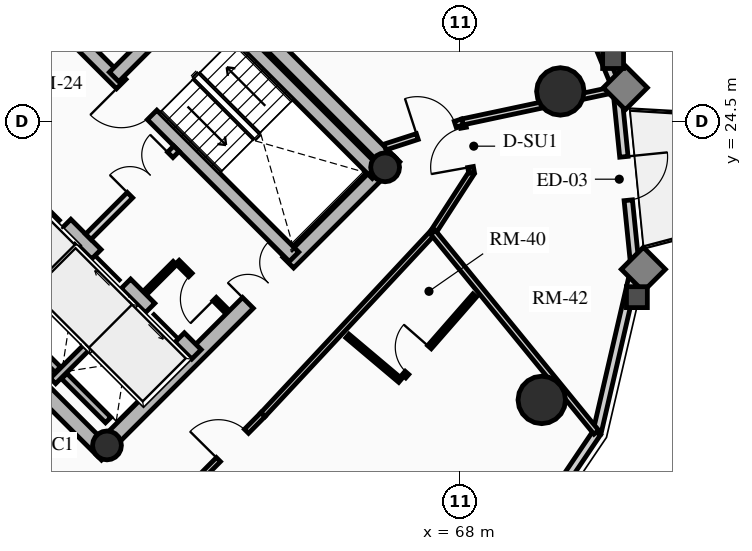
"""IFC4 building model, lengths in metres.
Left out: names, types, materials, properties, quantities, classifications, styles, units other than length and angle.
Written with IfcOpenShell. Run it as: python <this file> out.ifc"""

import sys

from ifc_helpers import new_model, si_unit, direction, frame, frame_2d, origin, origin_2d, place, context, subcontext, project, spatial, rectangle, circle, hollow_circle, extrude, source, transform, mapped, element, fill, save


model = new_model("IFC4")
c1 = context("Model", 3, precision=1e-05, world=origin(), true_north=direction((0.0, 1.0)))
c2 = subcontext(c1, "Body", "Model", "MODEL_VIEW")
j1 = project(units=[si_unit("LENGTHUNIT", "METRE"), si_unit("PLANEANGLEUNIT", "RADIAN")], contexts=[c1])
p1 = place(None, origin())
s1 = spatial("IfcSite", under=j1, at=p1, CompositionType="ELEMENT")
p2 = place(p1, origin())
s2 = spatial("IfcBuilding", under=s1, at=p2, CompositionType="ELEMENT")
p3 = place(p2, frame((0.0, 0.0, 177.79)))
s3 = spatial("IfcBuildingStorey", under=s2, at=p3, CompositionType="ELEMENT", Elevation=177.79)
for number, where, z_axis, x_axis in (
    (1, (58.702, 15.732, 0.0), (0.0, 0.0, 1.0), (-0.707, 0.707, 0.0)),
    (2, (66.268, 23.298, 0.0), (0.0, 0.0, 1.0), (-0.707, 0.707, 0.0)),
):
    element("IfcWall", number, at=place(p3, frame(where, z_axis=z_axis, x_axis=x_axis)), inside=s3, PredefinedType="SHEAR", context=c2, shape_type="SweptSolid", body=[
        extrude(rectangle(XDim=14.1, YDim=0.4, at=frame_2d((7.05, 0.0))), origin(), (0.0, 0.0, 1.0), 2.91),
    ])
p4 = place(p3, frame((58.561, 15.873, 0.0), z_axis=(0.0, 0.0, 1.0), x_axis=(0.707106781187, 0.707106781187, 0.0)))
e3 = element("IfcWall", 3, at=p4, inside=s3, PredefinedType="SHEAR", context=c2, shape_type="SweptSolid", body=[
    extrude(rectangle(XDim=10.7, YDim=0.4, at=frame_2d((5.35, 0.0))), origin(), (0.0, 0.0, 1.0), 2.91),
])
m1 = source(origin(), c2, "Body", "SweptSolid", [
    extrude(rectangle(XDim=1.5, YDim=2.02, at=frame_2d((0.75, 1.01))), frame((0.0, 0.21, 0.0), z_axis=(0.0, -1.0, 0.0), x_axis=(1.0, 0.0, 0.0)), (0.0, 0.0, 1.0), 0.42),
])
p5 = place(p4, frame((5.45, 0.0, 0.0)))
e4 = element("IfcOpeningElement", 4, at=p5, cuts=e3, PredefinedType="OPENING", context=c2, shape_type="MappedRepresentation", body=[
    mapped(m1, transform((0.0, 0.0, 0.0), x_axis=(1.0, 0.0, 0.0), y_axis=(0.0, 1.0, 0.0), z_axis=(0.0, 0.0, 1.0), scale=1.0)),
])
p6 = place(p3, frame((61.06, 18.373, 0.0), z_axis=(0.0, 0.0, 1.0), x_axis=(-0.707106781187, 0.707106781187, 0.0)))
e5 = element("IfcWall", 5, at=p6, inside=s3, PredefinedType="SHEAR", context=c2, shape_type="SweptSolid", body=[
    extrude(rectangle(XDim=13.7, YDim=0.35, at=frame_2d((6.85, 0.0))), origin(), (0.0, 0.0, 1.0), 2.91),
])
m2 = source(origin(), c2, "Body", "SweptSolid", [
    extrude(rectangle(XDim=1.1, YDim=2.015, at=frame_2d((0.55, 1.007))), frame((0.0, 0.185, 0.0), z_axis=(0.0, -1.0, 0.0), x_axis=(1.0, 0.0, 0.0)), (0.0, 0.0, 1.0), 0.37),
])
p7 = place(p6, frame((4.85, 0.0, 0.0)))
e6 = element("IfcOpeningElement", 6, at=p7, cuts=e5, PredefinedType="OPENING", context=c2, shape_type="MappedRepresentation", body=[
    mapped(m2, transform((0.0, 0.0, 0.0), x_axis=(1.0, 0.0, 0.0), y_axis=(0.0, 1.0, 0.0), z_axis=(0.0, 0.0, 1.0), scale=1.0)),
])
p8 = place(p6, frame((0.625, 0.0, 0.0)))
e7 = element("IfcOpeningElement", 7, at=p8, cuts=e5, PredefinedType="OPENING", context=c2, shape_type="MappedRepresentation", body=[
    mapped(m2, transform((0.0, 0.0, 0.0), x_axis=(1.0, 0.0, 0.0), y_axis=(0.0, 1.0, 0.0), z_axis=(0.0, 0.0, 1.0), scale=1.0)),
])
p9 = place(p6, frame((2.625, 0.0, 0.0)))
e8 = element("IfcOpeningElement", 8, at=p9, cuts=e5, PredefinedType="OPENING", context=c2, shape_type="MappedRepresentation", body=[
    mapped(m2, transform((0.0, 0.0, 0.0), x_axis=(1.0, 0.0, 0.0), y_axis=(0.0, 1.0, 0.0), z_axis=(0.0, 0.0, 1.0), scale=1.0)),
])
m3 = source(origin(), c2, "Body", "SweptSolid", [
    extrude(rectangle(XDim=1.15, YDim=2.02, at=frame_2d((0.575, 1.01))), frame((0.0, 0.185, 0.0), z_axis=(0.0, -1.0, 0.0), x_axis=(1.0, 0.0, 0.0)), (0.0, 0.0, 1.0), 0.37),
])
p10 = place(p6, frame((7.27, 0.0, 0.0)))
e9 = element("IfcOpeningElement", 9, at=p10, cuts=e5, PredefinedType="OPENING", context=c2, shape_type="MappedRepresentation", body=[
    mapped(m3, transform((0.0, 0.0, 0.0), x_axis=(1.0, 0.0, 0.0), y_axis=(0.0, 1.0, 0.0), z_axis=(0.0, 0.0, 1.0), scale=1.0)),
])
p11 = place(p3, frame((63.627, 20.94, 0.0), z_axis=(0.0, 0.0, 1.0), x_axis=(-0.707119496762, 0.707094065383, 0.0)))
e10 = element("IfcWall", 10, at=p11, inside=s3, PredefinedType="SHEAR", context=c2, shape_type="SweptSolid", body=[
    extrude(rectangle(XDim=9.6, YDim=0.35, at=frame_2d((4.8, 0.0))), origin(), (0.0, 0.0, 1.0), 2.91),
])
p12 = place(p11, frame((5.28, 0.0, 0.0)))
e11 = element("IfcOpeningElement", 11, at=p12, cuts=e10, PredefinedType="OPENING", context=c2, shape_type="MappedRepresentation", body=[
    mapped(m3, transform((0.0, 0.0, 0.0), x_axis=(1.0, 0.0, 0.0), y_axis=(0.0, 1.0, 0.0), z_axis=(0.0, 0.0, 1.0), scale=1.0)),
])
p13 = place(p3, frame((65.812, 23.125, 0.0), z_axis=(0.0, 0.0, 1.0), x_axis=(-0.707106781187, 0.707106781187, 0.0)))
e12 = element("IfcWall", 12, at=p13, inside=s3, PredefinedType="SHEAR", context=c2, shape_type="SweptSolid", body=[
    extrude(rectangle(XDim=6.695, YDim=0.35, at=frame_2d((3.348, 0.0))), origin(), (0.0, 0.0, 1.0), 2.91),
])
p14 = place(p3, frame((58.893, 25.674, 0.0), z_axis=(0.0, 0.0, 1.0), x_axis=(0.707106781187, 0.707106781187, 0.0)))
e13 = element("IfcWall", 13, at=p14, inside=s3, PredefinedType="SHEAR", context=c2, shape_type="SweptSolid", body=[
    extrude(rectangle(XDim=3.285, YDim=0.35, at=frame_2d((1.643, 0.0))), origin(), (0.0, 0.0, 1.0), 2.91),
])
for number, where, z_axis, x_axis in (
    (14, (58.706, 15.976, 0.0), (0.0, 0.0, 1.0), (0.707, 0.707, 0.0)),
    (15, (66.024, 23.294, 0.0), (0.0, 0.0, 1.0), (0.707, 0.707, 0.0)),
):
    element("IfcColumn", number, at=place(p3, frame(where, z_axis=z_axis, x_axis=x_axis)), inside=s3, PredefinedType="COLUMN", context=c2, shape_type="SweptSolid", body=[
        extrude(hollow_circle(Radius=0.38, WallThickness=0.032, at=origin_2d()), origin(), (0.0, 0.0, 1.0), 2.91),
    ])
for number, where, z_axis, x_axis in (
    (16, (70.146, 17.173, 0.0), (0.0, 0.0, 1.0), (1.0, 0.0, 0.0)),
    (17, (70.635, 25.291, 0.0), (0.0, 0.0, 1.0), (1.0, 0.0, 0.0)),
):
    element("IfcColumn", number, at=place(p3, frame(where, z_axis=z_axis, x_axis=x_axis)), inside=s3, PredefinedType="USERDEFINED", context=c2, shape_type="SweptSolid", body=[
        extrude(circle(Radius=0.625, at=origin_2d()), origin(), (0.0, 0.0, 1.0), 2.91),
    ])
p15 = place(p3, frame((71.6, 16.313, 0.0), z_axis=(0.0, 0.0, 1.0), x_axis=(-0.55951912514, -0.828817439852, 0.0)))
e18 = element("IfcWall", 18, at=p15, inside=s3, PredefinedType="SOLIDWALL", context=c2, shape_type="SweptSolid", body=[
    extrude(rectangle(XDim=4.259, YDim=0.22, at=frame_2d((2.129, 0.0))), origin(), (0.0, 0.0, 1.0), 2.245),
])
m4 = source(origin(), c2, "Body", "SweptSolid", [
    extrude(rectangle(XDim=1.6, YDim=1.3, at=frame_2d((0.8, 0.65))), frame((0.0, 0.12, 0.0), z_axis=(0.0, -1.0, 0.0), x_axis=(1.0, 0.0, 0.0)), (0.0, 0.0, 1.0), 0.24),
])
p16 = place(p15, frame((1.33, 0.0, 0.65)))
e19 = element("IfcOpeningElement", 19, at=p16, cuts=e18, PredefinedType="OPENING", context=c2, shape_type="MappedRepresentation", body=[
    mapped(m4, transform((0.0, 0.0, 0.0), x_axis=(1.0, 0.0, 0.0), y_axis=(0.0, 1.0, 0.0), z_axis=(0.0, 0.0, 1.0), scale=1.0)),
])
p17 = place(p3, frame((72.603, 20.645, 0.0), z_axis=(0.0, 0.0, 1.0), x_axis=(-0.22557328587, -0.97422620202, 0.0)))
e20 = element("IfcWall", 20, at=p17, inside=s3, PredefinedType="SOLIDWALL", context=c2, shape_type="SweptSolid", body=[
    extrude(rectangle(XDim=4.446, YDim=0.22, at=frame_2d((2.223, 0.0))), origin(), (0.0, 0.0, 1.0), 2.245),
])
p18 = place(p3, frame((72.127, 25.354, 0.0), z_axis=(0.0, 0.0, 1.0), x_axis=(0.100438356004, -0.994943283129, 0.0)))
e21 = element("IfcWall", 21, at=p18, inside=s3, PredefinedType="SOLIDWALL", context=c2, shape_type="SweptSolid", body=[
    extrude(rectangle(XDim=4.733, YDim=0.22, at=frame_2d((2.366, 0.0))), origin(), (0.0, 0.0, 1.0), 2.245),
])
m5 = source(origin(), c2, "Body", "SweptSolid", [
    extrude(rectangle(XDim=1.15, YDim=2.005, at=frame_2d((0.575, 1.002))), frame((0.0, 0.12, 0.0), z_axis=(0.0, -1.0, 0.0), x_axis=(1.0, 0.0, 0.0)), (0.0, 0.0, 1.0), 0.24),
])
p19 = place(p18, frame((1.791, 0.0, 0.0)))
e22 = element("IfcOpeningElement", 22, at=p19, cuts=e21, PredefinedType="OPENING", context=c2, shape_type="MappedRepresentation", body=[
    mapped(m5, transform((0.0, 0.0, 0.0), x_axis=(1.0, 0.0, 0.0), y_axis=(0.0, 1.0, 0.0), z_axis=(0.0, 0.0, 1.0), scale=1.0)),
])
p20 = place(p3, frame((70.22, 29.979, 0.0), z_axis=(0.0, 0.0, 1.0), x_axis=(0.381196434348, -0.924494066201, 0.0)))
e23 = element("IfcWall", 23, at=p20, inside=s3, PredefinedType="SOLIDWALL", context=c2, shape_type="SweptSolid", body=[
    extrude(rectangle(XDim=5.003, YDim=0.22, at=frame_2d((2.501, 0.0))), origin(), (0.0, 0.0, 1.0), 2.245),
])
p21 = place(p3, frame((55.888, 19.069, 0.0), z_axis=(0.0, 0.0, 1.0), x_axis=(0.707106781187, 0.707106781187, 0.0)))
e24 = element("IfcWall", 24, at=p21, inside=s3, PredefinedType="SHEAR", context=c2, shape_type="SweptSolid", body=[
    extrude(rectangle(XDim=2.97, YDim=0.2, at=frame_2d((1.485, 0.0))), origin(), (0.0, 0.0, 1.0), 2.91),
])
p22 = place(p3, frame((57.284, 17.673, 0.0), z_axis=(0.0, 0.0, 1.0), x_axis=(0.707147878904, 0.70706568108, 0.0)))
e25 = element("IfcWall", 25, at=p22, inside=s3, PredefinedType="SHEAR", context=c2, shape_type="SweptSolid", body=[
    extrude(rectangle(XDim=2.97, YDim=0.2, at=frame_2d((1.485, 0.0))), origin(), (0.0, 0.0, 1.0), 2.91),
])
p23 = place(p3, frame((57.412, 17.97, 0.0), z_axis=(0.0, 0.0, 1.0), x_axis=(-0.707106781187, 0.707106781187, 0.0)))
e26 = element("IfcWall", 26, at=p23, inside=s3, PredefinedType="SHEAR", context=c2, shape_type="SweptSolid", body=[
    extrude(rectangle(XDim=1.735, YDim=0.2, at=frame_2d((0.867, 0.0))), origin(), (0.0, 0.0, 1.0), 2.91),
])
p24 = place(p3, frame((58.737, 16.644, 0.0), z_axis=(0.0, 0.0, 1.0), x_axis=(-0.707032117043, 0.707181437447, 0.0)))
e27 = element("IfcWall", 27, at=p24, inside=s3, PredefinedType="SHEAR", context=c2, shape_type="SweptSolid", body=[
    extrude(rectangle(XDim=1.635, YDim=0.2, at=frame_2d((0.817, 0.0))), origin(), (0.0, 0.0, 1.0), 2.91),
])
p25 = place(p3, frame((58.214, 21.467, 0.0), z_axis=(0.0, 0.0, 1.0), x_axis=(0.707106781187, 0.707106781187, 0.0)))
e28 = element("IfcWall", 28, at=p25, inside=s3, PredefinedType="PARTITIONING", context=c2, shape_type="SweptSolid", body=[
    extrude(rectangle(XDim=3.28, YDim=0.2, at=frame_2d((1.64, 0.0))), origin(), (0.0, 0.0, 1.0), 2.675),
])
m6 = source(origin(), c2, "Body", "SweptSolid", [
    extrude(rectangle(XDim=1.5, YDim=2.02, at=frame_2d((0.75, 1.01))), frame((0.0, 0.11, 0.0), z_axis=(0.0, -1.0, 0.0), x_axis=(1.0, 0.0, 0.0)), (0.0, 0.0, 1.0), 0.22),
])
p26 = place(p25, frame((1.55, 0.0, 0.0)))
e29 = element("IfcOpeningElement", 29, at=p26, cuts=e28, PredefinedType="OPENING", context=c2, shape_type="MappedRepresentation", body=[
    mapped(m6, transform((0.0, 0.0, 0.0), x_axis=(1.0, 0.0, 0.0), y_axis=(0.0, 1.0, 0.0), z_axis=(0.0, 0.0, 1.0), scale=1.0)),
])
p27 = place(p3, frame((54.961, 24.719, 0.0), z_axis=(0.0, 0.0, 1.0), x_axis=(0.707106781187, 0.707106781187, 0.0)))
e30 = element("IfcWall", 30, at=p27, inside=s3, PredefinedType="PARTITIONING", context=c2, shape_type="SweptSolid", body=[
    extrude(rectangle(XDim=3.28, YDim=0.2, at=frame_2d((1.64, 0.0))), origin(), (0.0, 0.0, 1.0), 2.675),
])
m7 = source(origin(), c2, "Body", "SweptSolid", [
    extrude(rectangle(XDim=0.9, YDim=2.005, at=frame_2d((0.45, 1.002))), frame((0.0, 0.11, 0.0), z_axis=(0.0, -1.0, 0.0), x_axis=(1.0, 0.0, 0.0)), (0.0, 0.0, 1.0), 0.22),
])
p28 = place(p27, frame((0.16, 0.0, 0.0)))
e31 = element("IfcOpeningElement", 31, at=p28, cuts=e30, PredefinedType="OPENING", context=c2, shape_type="MappedRepresentation", body=[
    mapped(m7, transform((0.0, 0.0, 0.0), x_axis=(1.0, 0.0, 0.0), y_axis=(0.0, 1.0, 0.0), z_axis=(0.0, 0.0, 1.0), scale=1.0)),
])
p29 = place(p3, frame((61.835, 19.529, 0.0), z_axis=(0.0, 0.0, 1.0), x_axis=(-0.707174592913, 0.707038962956, 0.0)))
e32 = element("IfcWall", 32, at=p29, inside=s3, PredefinedType="PARTITIONING", context=c2, shape_type="SweptSolid", body=[
    extrude(rectangle(XDim=1.8, YDim=0.125, at=frame_2d((0.9, 0.0))), origin(), (0.0, 0.0, 1.0), 2.675),
])
m8 = source(origin(), c2, "Body", "SweptSolid", [
    extrude(rectangle(XDim=0.9, YDim=2.005, at=frame_2d((0.45, 1.002))), frame((0.0, 0.073, 0.0), z_axis=(0.0, -1.0, 0.0), x_axis=(1.0, 0.0, 0.0)), (0.0, 0.0, 1.0), 0.145),
])
p30 = place(p29, frame((0.42, 0.0, 0.0)))
e33 = element("IfcOpeningElement", 33, at=p30, cuts=e32, PredefinedType="OPENING", context=c2, shape_type="MappedRepresentation", body=[
    mapped(m8, transform((0.0, 0.0, 0.0), x_axis=(1.0, 0.0, 0.0), y_axis=(0.0, 1.0, 0.0), z_axis=(0.0, 0.0, 1.0), scale=1.0)),
])
p31 = place(p3, frame((59.713, 19.996, 0.0), z_axis=(0.0, 0.0, 1.0), x_axis=(0.707217726, 0.706995818963, 0.0)))
e34 = element("IfcWall", 34, at=p31, inside=s3, PredefinedType="PARTITIONING", context=c2, shape_type="SweptSolid", body=[
    extrude(rectangle(XDim=1.1, YDim=0.125, at=frame_2d((0.55, 0.0))), origin(), (0.0, 0.0, 1.0), 2.675),
])
p32 = place(p3, frame((60.501, 14.457, 0.0), z_axis=(0.0, 0.0, 1.0), x_axis=(0.704012266258, 0.710187812454, 0.0)))
e35 = element("IfcWall", 35, at=p32, inside=s3, PredefinedType="PARTITIONING", context=c2, shape_type="SweptSolid", body=[
    extrude(rectangle(XDim=3.281, YDim=0.15, at=frame_2d((1.641, 0.0))), origin(), (0.0, 0.0, 1.0), 2.245),
])
m9 = source(origin(), c2, "Body", "SweptSolid", [
    extrude(rectangle(XDim=1.05, YDim=2.015, at=frame_2d((0.525, 1.007))), frame((0.0, 0.085, 0.0), z_axis=(0.0, -1.0, 0.0), x_axis=(1.0, 0.0, 0.0)), (0.0, 0.0, 1.0), 0.17),
])
p33 = place(p32, frame((1.614, 0.0, 0.0)))
e36 = element("IfcOpeningElement", 36, at=p33, cuts=e35, PredefinedType="OPENING", context=c2, shape_type="MappedRepresentation", body=[
    mapped(m9, transform((0.0, 0.0, 0.0), x_axis=(1.0, 0.0, 0.0), y_axis=(0.0, 1.0, 0.0), z_axis=(0.0, 0.0, 1.0), scale=1.0)),
])
p34 = place(p3, frame((62.812, 16.788, 0.0), z_axis=(0.0, 0.0, 1.0), x_axis=(0.682323555485, 0.731050316757, 0.0)))
e37 = element("IfcWall", 37, at=p34, inside=s3, PredefinedType="PARTITIONING", context=c2, shape_type="SweptSolid", body=[
    extrude(rectangle(XDim=6.559, YDim=0.15, at=frame_2d((3.279, 0.0))), origin(), (0.0, 0.0, 1.0), 2.245),
])
p35 = place(p3, frame((67.287, 21.582, 0.0), z_axis=(0.0, 0.0, 1.0), x_axis=(0.543202443884, 0.839601753785, 0.0)))
e38 = element("IfcWall", 38, at=p35, inside=s3, PredefinedType="PARTITIONING", context=c2, shape_type="SweptSolid", body=[
    extrude(rectangle(XDim=1.866, YDim=0.15, at=frame_2d((0.933, 0.0))), origin(), (0.0, 0.0, 1.0), 2.245),
])
p36 = place(p3, frame((68.3, 23.149, 0.0), z_axis=(0.0, 0.0, 1.0), x_axis=(-0.176423554694, 0.984314344785, 0.0)))
e39 = element("IfcWall", 39, at=p36, inside=s3, PredefinedType="PARTITIONING", context=c2, shape_type="SweptSolid", body=[
    extrude(rectangle(XDim=1.362, YDim=0.15, at=frame_2d((0.681, 0.0))), origin(), (0.0, 0.0, 1.0), 2.245),
])
p37 = place(p36, frame((0.156, 0.0, 0.0)))
e40 = element("IfcOpeningElement", 40, at=p37, cuts=e39, PredefinedType="OPENING", context=c2, shape_type="MappedRepresentation", body=[
    mapped(m9, transform((0.0, 0.0, 0.0), x_axis=(1.0, 0.0, 0.0), y_axis=(0.0, 1.0, 0.0), z_axis=(0.0, 0.0, 1.0), scale=1.0)),
])
p38 = place(p3, frame((67.287, 21.582, 0.0), z_axis=(0.0, 0.0, 1.0), x_axis=(0.632528819581, -0.774536824431, 0.0)))
e41 = element("IfcWall", 41, at=p38, inside=s3, PredefinedType="PARTITIONING", context=c2, shape_type="SweptSolid", body=[
    extrude(rectangle(XDim=6.791, YDim=0.16, at=frame_2d((3.396, 0.0))), origin(), (0.0, 0.0, 1.0), 2.245),
])
p39 = place(p3, frame((68.06, 24.489, 0.0), z_axis=(0.0, 0.0, 1.0), x_axis=(0.978089830324, 0.2081832938, 0.0)))
e42 = element("IfcWall", 42, at=p39, inside=s3, PredefinedType="PARTITIONING", context=c2, shape_type="SweptSolid", body=[
    extrude(rectangle(XDim=4.138, YDim=0.16, at=frame_2d((2.069, 0.0))), origin(), (0.0, 0.0, 1.0), 2.245),
])
p40 = place(p3, frame((66.021, 23.828, 0.0), z_axis=(0.0, 0.0, 1.0), x_axis=(0.951292345965, 0.308290240695, 0.0)))
e43 = element("IfcWall", 43, at=p40, inside=s3, PredefinedType="PARTITIONING", context=c2, shape_type="SweptSolid", body=[
    extrude(rectangle(XDim=2.144, YDim=0.16, at=frame_2d((1.072, 0.0))), origin(), (0.0, 0.0, 1.0), 2.245),
])
m10 = source(origin(), c2, "Body", "SweptSolid", [
    extrude(rectangle(XDim=1.05, YDim=2.015, at=frame_2d((0.525, 1.007))), frame((0.0, 0.09, 0.0), z_axis=(0.0, -1.0, 0.0), x_axis=(1.0, 0.0, 0.0)), (0.0, 0.0, 1.0), 0.18),
])
p41 = place(p40, frame((0.894, 0.0, 0.0)))
e44 = element("IfcOpeningElement", 44, at=p41, cuts=e43, PredefinedType="OPENING", context=c2, shape_type="MappedRepresentation", body=[
    mapped(m10, transform((0.0, 0.0, 0.0), x_axis=(1.0, 0.0, 0.0), y_axis=(0.0, 1.0, 0.0), z_axis=(0.0, 0.0, 1.0), scale=1.0)),
])
p42 = place(p3, frame((65.033, 18.856, 0.0), z_axis=(0.0, 0.0, 1.0), x_axis=(0.764632588969, -0.644466449, 0.0)))
e45 = element("IfcWall", 45, at=p42, inside=s3, PredefinedType="PARTITIONING", context=c2, shape_type="SweptSolid", body=[
    extrude(rectangle(XDim=1.818, YDim=0.125, at=frame_2d((0.909, 0.0))), origin(), (0.0, 0.0, 1.0), 2.675),
])
p43 = place(p3, frame((66.52, 17.795, 0.0), z_axis=(0.0, 0.0, 1.0), x_axis=(0.658266024679, 0.752785388244, 0.0)))
e46 = element("IfcWall", 46, at=p43, inside=s3, PredefinedType="PARTITIONING", context=c2, shape_type="SweptSolid", body=[
    extrude(rectangle(XDim=2.826, YDim=0.125, at=frame_2d((1.413, 0.0))), origin(), (0.0, 0.0, 1.0), 2.245),
])
p44 = place(p43, frame((0.12, 0.0, 0.0)))
e47 = element("IfcOpeningElement", 47, at=p44, cuts=e46, PredefinedType="OPENING", context=c2, shape_type="MappedRepresentation", body=[
    mapped(m8, transform((0.0, 0.0, 0.0), x_axis=(1.0, 0.0, 0.0), y_axis=(0.0, 1.0, 0.0), z_axis=(0.0, 0.0, 1.0), scale=1.0)),
])
m11 = source(origin(), c2, "Body", "SweptSolid", [
    extrude(rectangle(XDim=1.15, YDim=2.005, at=frame_2d((0.575, 1.002))), frame((0.0, 0.025, 0.0), z_axis=(0.0, -1.0, 0.0), x_axis=(1.0, 0.0, 0.0)), (0.0, 0.0, 1.0), 0.05),
])
p45 = place(p19, origin())
e48 = element("IfcDoor", 48, at=p45, inside=s3, OperationType="SINGLE_SWING_LEFT", PredefinedType="DOOR", context=c2, shape_type="MappedRepresentation", body=[
    mapped(m11, transform((0.0, 0.0, 0.0), x_axis=(1.0, 0.0, 0.0), y_axis=(0.0, 1.0, 0.0), z_axis=(0.0, 0.0, 1.0), scale=1.0)),
])
fill(e22, e48)
m12 = source(origin(), c2, "Body", "SweptSolid", [
    extrude(rectangle(XDim=1.1, YDim=2.015, at=frame_2d((0.55, 1.007))), frame((0.0, 0.025, 0.0), z_axis=(0.0, -1.0, 0.0), x_axis=(1.0, 0.0, 0.0)), (0.0, 0.0, 1.0), 0.05),
])
p46 = place(p7, origin())
e49 = element("IfcDoor", 49, at=p46, inside=s3, OperationType="SLIDING_TO_RIGHT", PredefinedType="DOOR", context=c2, shape_type="MappedRepresentation", body=[
    mapped(m12, transform((0.0, 0.0, 0.0), x_axis=(1.0, 0.0, 0.0), y_axis=(0.0, 1.0, 0.0), z_axis=(0.0, 0.0, 1.0), scale=1.0)),
])
fill(e6, e49)
p47 = place(p8, origin())
e50 = element("IfcDoor", 50, at=p47, inside=s3, OperationType="SLIDING_TO_LEFT", PredefinedType="DOOR", context=c2, shape_type="MappedRepresentation", body=[
    mapped(m12, transform((0.0, 0.0, 0.0), x_axis=(1.0, 0.0, 0.0), y_axis=(0.0, 1.0, 0.0), z_axis=(0.0, 0.0, 1.0), scale=1.0)),
])
fill(e7, e50)
p48 = place(p9, origin())
e51 = element("IfcDoor", 51, at=p48, inside=s3, OperationType="SLIDING_TO_RIGHT", PredefinedType="DOOR", context=c2, shape_type="MappedRepresentation", body=[
    mapped(m12, transform((0.0, 0.0, 0.0), x_axis=(1.0, 0.0, 0.0), y_axis=(0.0, 1.0, 0.0), z_axis=(0.0, 0.0, 1.0), scale=1.0)),
])
fill(e8, e51)
m13 = source(origin(), c2, "Body", "SweptSolid", [
    extrude(rectangle(XDim=1.15, YDim=2.02, at=frame_2d((0.575, 1.01))), frame((0.0, 0.025, 0.0), z_axis=(0.0, -1.0, 0.0), x_axis=(1.0, 0.0, 0.0)), (0.0, 0.0, 1.0), 0.05),
])
p49 = place(p12, origin())
e52 = element("IfcDoor", 52, at=p49, inside=s3, OperationType="SINGLE_SWING_RIGHT", PredefinedType="DOOR", context=c2, shape_type="MappedRepresentation", body=[
    mapped(m13, transform((0.0, 0.0, 0.0), x_axis=(1.0, 0.0, 0.0), y_axis=(0.0, 1.0, 0.0), z_axis=(0.0, 0.0, 1.0), scale=1.0)),
])
fill(e11, e52)
m14 = source(origin(), c2, "Body", "SweptSolid", [
    extrude(rectangle(XDim=1.5, YDim=2.02, at=frame_2d((0.75, 1.01))), frame((0.0, 0.025, 0.0), z_axis=(0.0, -1.0, 0.0), x_axis=(1.0, 0.0, 0.0)), (0.0, 0.0, 1.0), 0.05),
])
p50 = place(p5, origin())
e53 = element("IfcDoor", 53, at=p50, inside=s3, OperationType="DOUBLE_DOOR_SINGLE_SWING", PredefinedType="DOOR", context=c2, shape_type="MappedRepresentation", body=[
    mapped(m14, transform((0.0, 0.0, 0.0), x_axis=(1.0, 0.0, 0.0), y_axis=(0.0, 1.0, 0.0), z_axis=(0.0, 0.0, 1.0), scale=1.0)),
])
fill(e4, e53)
p51 = place(p26, origin())
e54 = element("IfcDoor", 54, at=p51, inside=s3, OperationType="DOUBLE_DOOR_SINGLE_SWING", PredefinedType="DOOR", context=c2, shape_type="MappedRepresentation", body=[
    mapped(m14, transform((0.0, 0.0, 0.0), x_axis=(1.0, 0.0, 0.0), y_axis=(0.0, 1.0, 0.0), z_axis=(0.0, 0.0, 1.0), scale=1.0)),
])
fill(e29, e54)
m15 = source(origin(), c2, "Body", "SweptSolid", [
    extrude(rectangle(XDim=0.9, YDim=2.005, at=frame_2d((0.45, 1.002))), frame((0.0, 0.025, 0.0), z_axis=(0.0, -1.0, 0.0), x_axis=(1.0, 0.0, 0.0)), (0.0, 0.0, 1.0), 0.05),
])
p52 = place(p30, origin())
e55 = element("IfcDoor", 55, at=p52, inside=s3, OperationType="SINGLE_SWING_LEFT", PredefinedType="DOOR", context=c2, shape_type="MappedRepresentation", body=[
    mapped(m15, transform((0.0, 0.0, 0.0), x_axis=(1.0, 0.0, 0.0), y_axis=(0.0, 1.0, 0.0), z_axis=(0.0, 0.0, 1.0), scale=1.0)),
])
fill(e33, e55)
m16 = source(origin(), c2, "Body", "SweptSolid", [
    extrude(rectangle(XDim=1.05, YDim=2.015, at=frame_2d((0.525, 1.007))), frame((0.0, 0.025, 0.0), z_axis=(0.0, -1.0, 0.0), x_axis=(1.0, 0.0, 0.0)), (0.0, 0.0, 1.0), 0.05),
])
p53 = place(p41, origin())
e56 = element("IfcDoor", 56, at=p53, inside=s3, OperationType="SINGLE_SWING_LEFT", PredefinedType="DOOR", context=c2, shape_type="MappedRepresentation", body=[
    mapped(m16, transform((0.0, 0.0, 0.0), x_axis=(1.0, 0.0, 0.0), y_axis=(0.0, 1.0, 0.0), z_axis=(0.0, 0.0, 1.0), scale=1.0)),
])
fill(e44, e56)
p54 = place(p33, origin())
e57 = element("IfcDoor", 57, at=p54, inside=s3, OperationType="SINGLE_SWING_LEFT", PredefinedType="DOOR", context=c2, shape_type="MappedRepresentation", body=[
    mapped(m16, transform((0.0, 0.0, 0.0), x_axis=(1.0, 0.0, 0.0), y_axis=(0.0, 1.0, 0.0), z_axis=(0.0, 0.0, 1.0), scale=1.0)),
])
fill(e36, e57)
p55 = place(p44, origin())
e58 = element("IfcDoor", 58, at=p55, inside=s3, OperationType="SINGLE_SWING_RIGHT", PredefinedType="DOOR", context=c2, shape_type="MappedRepresentation", body=[
    mapped(m15, transform((0.0, 0.0, 0.0), x_axis=(1.0, 0.0, 0.0), y_axis=(0.0, 1.0, 0.0), z_axis=(0.0, 0.0, 1.0), scale=1.0)),
])
fill(e47, e58)
p56 = place(p37, origin())
e59 = element("IfcDoor", 59, at=p56, inside=s3, OperationType="SINGLE_SWING_LEFT", PredefinedType="DOOR", context=c2, shape_type="MappedRepresentation", body=[
    mapped(m16, transform((0.0, 0.0, 0.0), x_axis=(1.0, 0.0, 0.0), y_axis=(0.0, 1.0, 0.0), z_axis=(0.0, 0.0, 1.0), scale=1.0)),
])
fill(e40, e59)
save(model, sys.argv[1])
